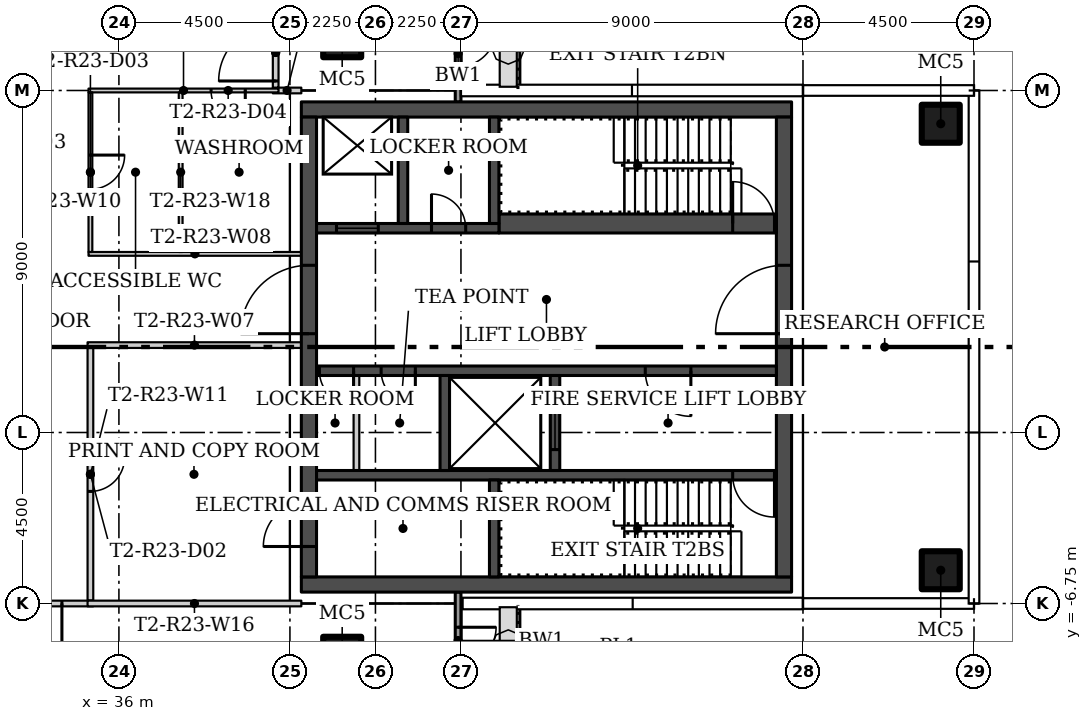
"""IFC4 building model, lengths in metres.
Left out: names, types, materials, properties, quantities, classifications, styles, units other than length and angle.
Written with IfcOpenShell. Run it as: python <this file> out.ifc"""

import sys

from ifc_helpers import new_model, si_unit, direction, frame, frame_2d, origin, origin_2d, place, context, subcontext, project, spatial, rectangle, hollow_rectangle, extrude, element, fill, save


model = new_model("IFC4")
c1 = context("Model", 3, precision=1e-05, world=origin(), true_north=direction((0.0, 1.0)))
c2 = subcontext(c1, "Body", "Model", "MODEL_VIEW")
j1 = project(units=[si_unit("LENGTHUNIT", "METRE"), si_unit("PLANEANGLEUNIT", "RADIAN")], contexts=[c1])
p1 = place(None, origin())
s1 = spatial("IfcSite", under=j1, at=p1, CompositionType="ELEMENT")
p2 = place(p1, origin())
s2 = spatial("IfcBuilding", under=s1, at=p2, CompositionType="ELEMENT")
p3 = place(p2, frame((0.0, 0.0, 210.0)))
s3 = spatial("IfcBuildingStorey", under=s2, at=p3, CompositionType="ELEMENT", Elevation=210.0)
for number, where in (
    (1, (41.875, 8.125, 0.0)),
    (2, (41.875, -8.125, 0.0)),
    (3, (57.625, -5.875, 0.0)),
    (4, (57.625, 5.875, 0.0)),
):
    element("IfcColumn", number, at=place(p3, frame(where)), inside=s3, PredefinedType="COLUMN", context=c2, shape_type="SweptSolid", body=[
        extrude(hollow_rectangle(XDim=1.0, YDim=1.0, WallThickness=0.04, at=origin_2d()), origin(), (0.0, 0.0, 1.0), 3.55),
    ])
p4 = place(p3, frame((40.8, 6.75, 0.0), z_axis=(0.0, 0.0, 1.0), x_axis=(-1.0, 0.0, 0.0)))
e5 = element("IfcWall", 5, at=p4, inside=s3, PredefinedType="PARTITIONING", context=c2, shape_type="SweptSolid", body=[
    extrude(rectangle(XDim=0.75, YDim=0.15, at=frame_2d((0.375, 0.0))), origin(), (0.0, 0.0, 1.0), 3.55),
])
p5 = place(p3, frame((40.8, 0.05, 0.0), z_axis=(0.0, 0.0, 1.0), x_axis=(-1.0, 0.0, 0.0)))
e6 = element("IfcWall", 6, at=p5, inside=s3, PredefinedType="PARTITIONING", context=c2, shape_type="SweptSolid", body=[
    extrude(rectangle(XDim=5.625, YDim=0.15, at=frame_2d((2.812, 0.0))), origin(), (0.0, 0.0, 1.0), 3.55),
])
p6 = place(p3, frame((35.2, 2.45, 0.0)))
e7 = element("IfcWall", 7, at=p6, inside=s3, PredefinedType="PARTITIONING", context=c2, shape_type="SweptSolid", body=[
    extrude(rectangle(XDim=5.6, YDim=0.1, at=frame_2d((2.8, 0.0))), origin(), (0.0, 0.0, 1.0), 3.55),
])
p7 = place(p3, frame((40.2, 6.75, 0.0), z_axis=(0.0, 0.0, 1.0), x_axis=(-1.0, 0.0, 0.0)))
e8 = element("IfcWall", 8, at=p7, inside=s3, PredefinedType="PARTITIONING", context=c2, shape_type="SweptSolid", body=[
    extrude(rectangle(XDim=5.0, YDim=0.1, at=frame_2d((2.5, 0.0))), origin(), (0.0, 0.0, 1.0), 3.55),
])
p8 = place(p7, frame((0.875, 0.0, 0.0)))
e9 = element("IfcOpeningElement", 9, at=p8, cuts=e8, PredefinedType="OPENING", context=c2, shape_type="SweptSolid", body=[
    extrude(rectangle(XDim=0.9, YDim=2.1, at=frame_2d((0.45, 1.05))), frame((0.0, 0.06, 0.0), z_axis=(0.0, -1.0, 0.0), x_axis=(1.0, 0.0, 0.0)), (0.0, 0.0, 1.0), 0.12),
])
p9 = place(p3, frame((35.25, 6.7, 0.0), z_axis=(0.0, 0.0, 1.0), x_axis=(0.0, -1.0, 0.0)))
e10 = element("IfcWall", 10, at=p9, inside=s3, PredefinedType="PARTITIONING", context=c2, shape_type="SweptSolid", body=[
    extrude(rectangle(XDim=4.2, YDim=0.1, at=frame_2d((2.1, 0.0))), origin(), (0.0, 0.0, 1.0), 3.55),
])
p10 = place(p9, frame((1.65, 0.0, 0.0)))
e11 = element("IfcOpeningElement", 11, at=p10, cuts=e10, PredefinedType="OPENING", context=c2, shape_type="SweptSolid", body=[
    extrude(rectangle(XDim=0.9, YDim=2.1, at=frame_2d((0.45, 1.05))), frame((0.0, 0.06, 0.0), z_axis=(0.0, -1.0, 0.0), x_axis=(1.0, 0.0, 0.0)), (0.0, 0.0, 1.0), 0.12),
])
p11 = place(p3, frame((35.25, -0.025, 0.0), z_axis=(0.0, 0.0, 1.0), x_axis=(0.0, -1.0, 0.0)))
e12 = element("IfcWall", 12, at=p11, inside=s3, PredefinedType="PARTITIONING", context=c2, shape_type="SweptSolid", body=[
    extrude(rectangle(XDim=6.65, YDim=0.15, at=frame_2d((3.325, 0.0))), origin(), (0.0, 0.0, 1.0), 3.55),
])
p12 = place(p11, frame((2.875, 0.0, 0.0)))
e13 = element("IfcOpeningElement", 13, at=p12, cuts=e12, PredefinedType="OPENING", context=c2, shape_type="SweptSolid", body=[
    extrude(rectangle(XDim=0.9, YDim=2.1, at=frame_2d((0.45, 1.05))), frame((0.0, 0.085, 0.0), z_axis=(0.0, -1.0, 0.0), x_axis=(1.0, 0.0, 0.0)), (0.0, 0.0, 1.0), 0.17),
])
p13 = place(p3, frame((40.125, 6.825, 0.0), z_axis=(0.0, 0.0, 1.0), x_axis=(0.0, 1.0, 0.0)))
e14 = element("IfcWall", 14, at=p13, inside=s3, PredefinedType="PARTITIONING", context=c2, shape_type="SweptSolid", body=[
    extrude(rectangle(XDim=1.85, YDim=0.15, at=frame_2d((0.925, 0.0))), origin(), (0.0, 0.0, 1.0), 3.55),
])
p14 = place(p13, frame((0.175, 0.0, 0.0)))
e15 = element("IfcOpeningElement", 15, at=p14, cuts=e14, PredefinedType="OPENING", context=c2, shape_type="SweptSolid", body=[
    extrude(rectangle(XDim=1.5, YDim=2.1, at=frame_2d((0.75, 1.05))), frame((0.0, 0.085, 0.0), z_axis=(0.0, -1.0, 0.0), x_axis=(1.0, 0.0, 0.0)), (0.0, 0.0, 1.0), 0.17),
])
p15 = place(p3, frame((35.325, -6.75, 0.0), z_axis=(0.0, 0.0, 1.0), x_axis=(-1.0, 0.0, 0.0)))
e16 = element("IfcWall", 16, at=p15, inside=s3, PredefinedType="PARTITIONING", context=c2, shape_type="SweptSolid", body=[
    extrude(rectangle(XDim=3.15, YDim=0.15, at=frame_2d((1.575, 0.0))), origin(), (0.0, 0.0, 1.0), 3.55),
])
p16 = place(p15, frame((0.825, 0.0, 0.0)))
e17 = element("IfcOpeningElement", 17, at=p16, cuts=e16, PredefinedType="OPENING", context=c2, shape_type="SweptSolid", body=[
    extrude(rectangle(XDim=1.5, YDim=2.1, at=frame_2d((0.75, 1.05))), frame((0.0, 0.085, 0.0), z_axis=(0.0, -1.0, 0.0), x_axis=(1.0, 0.0, 0.0)), (0.0, 0.0, 1.0), 0.17),
])
p17 = place(p3, frame((35.175, -6.75, 0.0)))
e18 = element("IfcWall", 18, at=p17, inside=s3, PredefinedType="PARTITIONING", context=c2, shape_type="SweptSolid", body=[
    extrude(rectangle(XDim=5.625, YDim=0.15, at=frame_2d((2.812, 0.0))), origin(), (0.0, 0.0, 1.0), 3.55),
])
p18 = place(p3, frame((37.625, 6.7, 0.0), z_axis=(0.0, 0.0, 1.0), x_axis=(0.0, -1.0, 0.0)))
e19 = element("IfcWall", 19, at=p18, inside=s3, PredefinedType="PARTITIONING", context=c2, shape_type="SweptSolid", body=[
    extrude(rectangle(XDim=4.2, YDim=0.1, at=frame_2d((2.1, 0.0))), origin(), (0.0, 0.0, 1.0), 3.55),
])
p19 = place(p3, frame((44.925, 9.0, 0.0), z_axis=(0.0, 0.0, 1.0), x_axis=(0.0, -1.0, 0.0)))
e20 = element("IfcWall", 20, at=p19, inside=s3, PredefinedType="SOLIDWALL", context=c2, shape_type="SweptSolid", body=[
    extrude(rectangle(XDim=2.557, YDim=0.15, at=frame_2d((1.278, 0.0))), origin(), (0.0, 0.0, 1.0), 3.45),
])
p20 = place(p19, frame((0.625, 0.0, 0.0)))
e21 = element("IfcOpeningElement", 21, at=p20, cuts=e20, PredefinedType="OPENING", context=c2, shape_type="SweptSolid", body=[
    extrude(rectangle(XDim=1.0, YDim=2.4, at=frame_2d((0.5, 1.2))), frame((0.0, 0.085, 0.0), z_axis=(0.0, -1.0, 0.0), x_axis=(1.0, 0.0, 0.0)), (0.0, 0.0, 1.0), 0.17),
])
p21 = place(p3, frame((44.925, -6.448, 0.0), z_axis=(0.0, 0.0, 1.0), x_axis=(0.0, -1.0, 0.0)))
e22 = element("IfcWall", 22, at=p21, inside=s3, PredefinedType="SOLIDWALL", context=c2, shape_type="SweptSolid", body=[
    extrude(rectangle(XDim=2.552, YDim=0.15, at=frame_2d((1.276, 0.0))), origin(), (0.0, 0.0, 1.0), 3.45),
])
p22 = place(p21, frame((0.927, 0.0, 0.0)))
e23 = element("IfcOpeningElement", 23, at=p22, cuts=e22, PredefinedType="OPENING", context=c2, shape_type="SweptSolid", body=[
    extrude(rectangle(XDim=1.0, YDim=2.4, at=frame_2d((0.5, 1.2))), frame((0.0, 0.085, 0.0), z_axis=(0.0, -1.0, 0.0), x_axis=(1.0, 0.0, 0.0)), (0.0, 0.0, 1.0), 0.17),
])
for number, where, z_axis, x_axis in (
    (24, (53.7, -6.25, 0.0), (0.0, 0.0, 1.0), (-1.0, 0.0, 0.0)),
    (25, (53.7, 6.25, 0.0), (0.0, 0.0, 1.0), (-1.0, 0.0, 0.0)),
):
    element("IfcWall", number, at=place(p3, frame(where, z_axis=z_axis, x_axis=x_axis)), inside=s3, PredefinedType="SHEAR", context=c2, shape_type="SweptSolid", body=[
        extrude(rectangle(XDim=12.9, YDim=0.4, at=frame_2d((6.45, 0.0))), origin(), (0.0, 0.0, 1.0), 3.55),
    ])
p23 = place(p3, frame((53.5, -6.05, 0.0), z_axis=(0.0, 0.0, 1.0), x_axis=(0.0, 1.0, 0.0)))
e26 = element("IfcWall", 26, at=p23, inside=s3, PredefinedType="SHEAR", context=c2, shape_type="SweptSolid", body=[
    extrude(rectangle(XDim=12.1, YDim=0.4, at=frame_2d((6.05, 0.0))), origin(), (0.0, 0.0, 1.0), 3.55),
])
p24 = place(p23, frame((6.4, 0.0, 0.0)))
e27 = element("IfcOpeningElement", 27, at=p24, cuts=e26, PredefinedType="OPENING", context=c2, shape_type="SweptSolid", body=[
    extrude(rectangle(XDim=1.8, YDim=2.4, at=frame_2d((0.9, 1.2))), frame((0.0, 0.21, 0.0), z_axis=(0.0, -1.0, 0.0), x_axis=(1.0, 0.0, 0.0)), (0.0, 0.0, 1.0), 0.42),
])
p25 = place(p3, frame((41.0, -6.05, 0.0), z_axis=(0.0, 0.0, 1.0), x_axis=(0.0, 1.0, 0.0)))
e28 = element("IfcWall", 28, at=p25, inside=s3, PredefinedType="SHEAR", context=c2, shape_type="SweptSolid", body=[
    extrude(rectangle(XDim=12.1, YDim=0.4, at=frame_2d((6.05, 0.0))), origin(), (0.0, 0.0, 1.0), 3.55),
])
p26 = place(p25, frame((0.8, 0.0, 0.0)))
e29 = element("IfcOpeningElement", 29, at=p26, cuts=e28, PredefinedType="OPENING", context=c2, shape_type="SweptSolid", body=[
    extrude(rectangle(XDim=1.2, YDim=2.1, at=frame_2d((0.6, 1.05))), frame((0.0, 0.21, 0.0), z_axis=(0.0, -1.0, 0.0), x_axis=(1.0, 0.0, 0.0)), (0.0, 0.0, 1.0), 0.42),
])
p27 = place(p25, frame((6.4, 0.0, 0.0)))
e30 = element("IfcOpeningElement", 30, at=p27, cuts=e28, PredefinedType="OPENING", context=c2, shape_type="SweptSolid", body=[
    extrude(rectangle(XDim=1.8, YDim=2.4, at=frame_2d((0.9, 1.2))), frame((0.0, 0.21, 0.0), z_axis=(0.0, -1.0, 0.0), x_axis=(1.0, 0.0, 0.0)), (0.0, 0.0, 1.0), 0.42),
])
p28 = place(p3, frame((53.3, -3.375, 0.0), z_axis=(0.0, 0.0, 1.0), x_axis=(-1.0, 0.0, 0.0)))
e31 = element("IfcWall", 31, at=p28, inside=s3, PredefinedType="SHEAR", context=c2, shape_type="SweptSolid", body=[
    extrude(rectangle(XDim=12.1, YDim=0.25, at=frame_2d((6.05, 0.0))), origin(), (0.0, 0.0, 1.0), 3.55),
])
p29 = place(p28, frame((0.05, 0.0, 0.0)))
e32 = element("IfcOpeningElement", 32, at=p29, cuts=e31, PredefinedType="OPENING", context=c2, shape_type="SweptSolid", body=[
    extrude(rectangle(XDim=1.1, YDim=2.1, at=frame_2d((0.55, 1.05))), frame((0.0, 0.135, 0.0), z_axis=(0.0, -1.0, 0.0), x_axis=(1.0, 0.0, 0.0)), (0.0, 0.0, 1.0), 0.27),
])
p30 = place(p3, frame((45.875, -6.05, 0.0), z_axis=(0.0, 0.0, 1.0), x_axis=(0.0, 1.0, 0.0)))
e33 = element("IfcWall", 33, at=p30, inside=s3, PredefinedType="SHEAR", context=c2, shape_type="SweptSolid", body=[
    extrude(rectangle(XDim=2.55, YDim=0.25, at=frame_2d((1.275, 0.0))), origin(), (0.0, 0.0, 1.0), 3.55),
])
p31 = place(p3, frame((53.3, -0.625, 0.0), z_axis=(0.0, 0.0, 1.0), x_axis=(-1.0, 0.0, 0.0)))
e34 = element("IfcWall", 34, at=p31, inside=s3, PredefinedType="SHEAR", context=c2, shape_type="SweptSolid", body=[
    extrude(rectangle(XDim=12.1, YDim=0.25, at=frame_2d((6.05, 0.0))), origin(), (0.0, 0.0, 1.0), 3.55),
])
p32 = place(p31, frame((2.25, 0.0, 0.0)))
e35 = element("IfcOpeningElement", 35, at=p32, cuts=e34, PredefinedType="OPENING", context=c2, shape_type="SweptSolid", body=[
    extrude(rectangle(XDim=1.2, YDim=2.1, at=frame_2d((0.6, 1.05))), frame((0.0, 0.135, 0.0), z_axis=(0.0, -1.0, 0.0), x_axis=(1.0, 0.0, 0.0)), (0.0, 0.0, 1.0), 0.27),
])
p33 = place(p31, frame((9.5, 0.0, 0.0)))
e36 = element("IfcOpeningElement", 36, at=p33, cuts=e34, PredefinedType="OPENING", context=c2, shape_type="SweptSolid", body=[
    extrude(rectangle(XDim=0.9, YDim=2.1, at=frame_2d((0.45, 1.05))), frame((0.0, 0.135, 0.0), z_axis=(0.0, -1.0, 0.0), x_axis=(1.0, 0.0, 0.0)), (0.0, 0.0, 1.0), 0.27),
])
p34 = place(p31, frame((11.125, 0.0, 0.0)))
e37 = element("IfcOpeningElement", 37, at=p34, cuts=e34, PredefinedType="OPENING", context=c2, shape_type="SweptSolid", body=[
    extrude(rectangle(XDim=0.9, YDim=2.1, at=frame_2d((0.45, 1.05))), frame((0.0, 0.135, 0.0), z_axis=(0.0, -1.0, 0.0), x_axis=(1.0, 0.0, 0.0)), (0.0, 0.0, 1.0), 0.27),
])
p35 = place(p3, frame((47.475, -3.25, 0.0), z_axis=(0.0, 0.0, 1.0), x_axis=(0.0, 1.0, 0.0)))
e38 = element("IfcWall", 38, at=p35, inside=s3, PredefinedType="SHEAR", context=c2, shape_type="SweptSolid", body=[
    extrude(rectangle(XDim=2.5, YDim=0.25, at=frame_2d((1.25, 0.0))), origin(), (0.0, 0.0, 1.0), 3.55),
])
p36 = place(p35, frame((0.55, 0.0, 0.0)))
e39 = element("IfcOpeningElement", 39, at=p36, cuts=e38, PredefinedType="OPENING", context=c2, shape_type="SweptSolid", body=[
    extrude(rectangle(XDim=1.4, YDim=2.4, at=frame_2d((0.7, 1.2))), frame((0.0, 0.135, 0.0), z_axis=(0.0, -1.0, 0.0), x_axis=(1.0, 0.0, 0.0)), (0.0, 0.0, 1.0), 0.27),
])
p37 = place(p3, frame((44.575, -3.25, 0.0), z_axis=(0.0, 0.0, 1.0), x_axis=(0.0, 1.0, 0.0)))
e40 = element("IfcWall", 40, at=p37, inside=s3, PredefinedType="SHEAR", context=c2, shape_type="SweptSolid", body=[
    extrude(rectangle(XDim=2.5, YDim=0.25, at=frame_2d((1.25, 0.0))), origin(), (0.0, 0.0, 1.0), 3.55),
])
p38 = place(p3, frame((42.25, -3.25, 0.0), z_axis=(0.0, 0.0, 1.0), x_axis=(0.0, 1.0, 0.0)))
e41 = element("IfcWall", 41, at=p38, inside=s3, PredefinedType="PARTITIONING", context=c2, shape_type="SweptSolid", body=[
    extrude(rectangle(XDim=2.5, YDim=0.15, at=frame_2d((1.25, 0.0))), origin(), (0.0, 0.0, 1.0), 3.55),
])
p39 = place(p3, frame((46.0, 3.25, 0.0)))
e42 = element("IfcWall", 42, at=p39, inside=s3, PredefinedType="SHEAR", context=c2, shape_type="SweptSolid", body=[
    extrude(rectangle(XDim=7.3, YDim=0.5, at=frame_2d((3.65, 0.0))), origin(), (0.0, 0.0, 1.0), 3.55),
])
p40 = place(p39, frame((6.15, 0.0, 0.0)))
e43 = element("IfcOpeningElement", 43, at=p40, cuts=e42, PredefinedType="OPENING", context=c2, shape_type="SweptSolid", body=[
    extrude(rectangle(XDim=1.1, YDim=2.1, at=frame_2d((0.55, 1.05))), frame((0.0, 0.26, 0.0), z_axis=(0.0, -1.0, 0.0), x_axis=(1.0, 0.0, 0.0)), (0.0, 0.0, 1.0), 0.52),
])
p41 = place(p3, frame((41.2, 3.125, 0.0)))
e44 = element("IfcWall", 44, at=p41, inside=s3, PredefinedType="SHEAR", context=c2, shape_type="SweptSolid", body=[
    extrude(rectangle(XDim=4.8, YDim=0.25, at=frame_2d((2.4, 0.0))), origin(), (0.0, 0.0, 1.0), 3.55),
])
p42 = place(p41, frame((0.525, 0.0, 0.0)))
e45 = element("IfcOpeningElement", 45, at=p42, cuts=e44, PredefinedType="OPENING", context=c2, shape_type="SweptSolid", body=[
    extrude(rectangle(XDim=1.1, YDim=2.1, at=frame_2d((0.55, 1.05))), frame((0.0, 0.135, 0.0), z_axis=(0.0, -1.0, 0.0), x_axis=(1.0, 0.0, 0.0)), (0.0, 0.0, 1.0), 0.27),
])
p43 = place(p41, frame((3.025, 0.0, 0.0)))
e46 = element("IfcOpeningElement", 46, at=p43, cuts=e44, PredefinedType="OPENING", context=c2, shape_type="SweptSolid", body=[
    extrude(rectangle(XDim=0.9, YDim=2.1, at=frame_2d((0.45, 1.05))), frame((0.0, 0.135, 0.0), z_axis=(0.0, -1.0, 0.0), x_axis=(1.0, 0.0, 0.0)), (0.0, 0.0, 1.0), 0.27),
])
for number, where, z_axis, x_axis in (
    (47, (45.875, 3.25, 0.0), (0.0, 0.0, 1.0), (0.0, 1.0, 0.0)),
    (48, (43.475, 3.25, 0.0), (0.0, 0.0, 1.0), (0.0, 1.0, 0.0)),
):
    element("IfcWall", number, at=place(p3, frame(where, z_axis=z_axis, x_axis=x_axis)), inside=s3, PredefinedType="SHEAR", context=c2, shape_type="SweptSolid", body=[
        extrude(rectangle(XDim=2.8, YDim=0.25, at=frame_2d((1.4, 0.0))), origin(), (0.0, 0.0, 1.0), 3.55),
    ])
p44 = place(p14, origin())
e49 = element("IfcDoor", 49, at=p44, inside=s3, OperationType="DOUBLE_DOOR_SINGLE_SWING", PredefinedType="DOOR", context=c2, shape_type="SweptSolid", body=[
    extrude(rectangle(XDim=1.5, YDim=2.1, at=frame_2d((0.75, 1.05))), frame((0.0, 0.025, 0.0), z_axis=(0.0, -1.0, 0.0), x_axis=(1.0, 0.0, 0.0)), (0.0, 0.0, 1.0), 0.05),
])
fill(e15, e49)
p45 = place(p12, origin())
e50 = element("IfcDoor", 50, at=p45, inside=s3, OperationType="SINGLE_SWING_RIGHT", PredefinedType="DOOR", context=c2, shape_type="SweptSolid", body=[
    extrude(rectangle(XDim=0.9, YDim=2.1, at=frame_2d((0.45, 1.05))), frame((0.0, 0.025, 0.0), z_axis=(0.0, -1.0, 0.0), x_axis=(1.0, 0.0, 0.0)), (0.0, 0.0, 1.0), 0.05),
])
fill(e13, e50)
p46 = place(p10, origin())
e51 = element("IfcDoor", 51, at=p46, inside=s3, OperationType="SINGLE_SWING_RIGHT", PredefinedType="DOOR", context=c2, shape_type="SweptSolid", body=[
    extrude(rectangle(XDim=0.9, YDim=2.1, at=frame_2d((0.45, 1.05))), frame((0.0, 0.025, 0.0), z_axis=(0.0, -1.0, 0.0), x_axis=(1.0, 0.0, 0.0)), (0.0, 0.0, 1.0), 0.05),
])
fill(e11, e51)
p47 = place(p8, origin())
e52 = element("IfcDoor", 52, at=p47, inside=s3, OperationType="SINGLE_SWING_RIGHT", PredefinedType="DOOR", context=c2, shape_type="SweptSolid", body=[
    extrude(rectangle(XDim=0.9, YDim=2.1, at=frame_2d((0.45, 1.05))), frame((0.0, 0.025, 0.0), z_axis=(0.0, -1.0, 0.0), x_axis=(1.0, 0.0, 0.0)), (0.0, 0.0, 1.0), 0.05),
])
fill(e9, e52)
p48 = place(p16, origin())
e53 = element("IfcDoor", 53, at=p48, inside=s3, OperationType="DOUBLE_DOOR_SINGLE_SWING", PredefinedType="DOOR", context=c2, shape_type="SweptSolid", body=[
    extrude(rectangle(XDim=1.5, YDim=2.1, at=frame_2d((0.75, 1.05))), frame((0.0, 0.025, 0.0), z_axis=(0.0, -1.0, 0.0), x_axis=(1.0, 0.0, 0.0)), (0.0, 0.0, 1.0), 0.05),
])
fill(e17, e53)
p49 = place(p20, origin())
e54 = element("IfcDoor", 54, at=p49, inside=s3, OperationType="SINGLE_SWING_LEFT", PredefinedType="DOOR", context=c2, shape_type="SweptSolid", body=[
    extrude(rectangle(XDim=1.0, YDim=2.4, at=frame_2d((0.5, 1.2))), frame((0.0, 0.025, 0.0), z_axis=(0.0, -1.0, 0.0), x_axis=(1.0, 0.0, 0.0)), (0.0, 0.0, 1.0), 0.05),
])
fill(e21, e54)
p50 = place(p22, origin())
e55 = element("IfcDoor", 55, at=p50, inside=s3, OperationType="SINGLE_SWING_RIGHT", PredefinedType="DOOR", context=c2, shape_type="SweptSolid", body=[
    extrude(rectangle(XDim=1.0, YDim=2.4, at=frame_2d((0.5, 1.2))), frame((0.0, 0.025, 0.0), z_axis=(0.0, -1.0, 0.0), x_axis=(1.0, 0.0, 0.0)), (0.0, 0.0, 1.0), 0.05),
])
fill(e23, e55)
p51 = place(p24, origin())
e56 = element("IfcDoor", 56, at=p51, inside=s3, OperationType="DOUBLE_DOOR_SINGLE_SWING", PredefinedType="DOOR", context=c2, shape_type="SweptSolid", body=[
    extrude(rectangle(XDim=1.8, YDim=2.4, at=frame_2d((0.9, 1.2))), frame((0.0, 0.025, 0.0), z_axis=(0.0, -1.0, 0.0), x_axis=(1.0, 0.0, 0.0)), (0.0, 0.0, 1.0), 0.05),
])
fill(e27, e56)
p52 = place(p26, origin())
e57 = element("IfcDoor", 57, at=p52, inside=s3, OperationType="SINGLE_SWING_LEFT", PredefinedType="DOOR", context=c2, shape_type="SweptSolid", body=[
    extrude(rectangle(XDim=1.2, YDim=2.1, at=frame_2d((0.6, 1.05))), frame((0.0, 0.025, 0.0), z_axis=(0.0, -1.0, 0.0), x_axis=(1.0, 0.0, 0.0)), (0.0, 0.0, 1.0), 0.05),
])
fill(e29, e57)
p53 = place(p27, origin())
e58 = element("IfcDoor", 58, at=p53, inside=s3, OperationType="DOUBLE_DOOR_SINGLE_SWING", PredefinedType="DOOR", context=c2, shape_type="SweptSolid", body=[
    extrude(rectangle(XDim=1.8, YDim=2.4, at=frame_2d((0.9, 1.2))), frame((0.0, 0.025, 0.0), z_axis=(0.0, -1.0, 0.0), x_axis=(1.0, 0.0, 0.0)), (0.0, 0.0, 1.0), 0.05),
])
fill(e30, e58)
p54 = place(p29, origin())
e59 = element("IfcDoor", 59, at=p54, inside=s3, OperationType="SINGLE_SWING_LEFT", PredefinedType="DOOR", context=c2, shape_type="SweptSolid", body=[
    extrude(rectangle(XDim=1.1, YDim=2.1, at=frame_2d((0.55, 1.05))), frame((0.0, 0.025, 0.0), z_axis=(0.0, -1.0, 0.0), x_axis=(1.0, 0.0, 0.0)), (0.0, 0.0, 1.0), 0.05),
])
fill(e32, e59)
p55 = place(p32, origin())
e60 = element("IfcDoor", 60, at=p55, inside=s3, OperationType="SINGLE_SWING_LEFT", PredefinedType="DOOR", context=c2, shape_type="SweptSolid", body=[
    extrude(rectangle(XDim=1.2, YDim=2.1, at=frame_2d((0.6, 1.05))), frame((0.0, 0.025, 0.0), z_axis=(0.0, -1.0, 0.0), x_axis=(1.0, 0.0, 0.0)), (0.0, 0.0, 1.0), 0.05),
])
fill(e35, e60)
p56 = place(p33, origin())
e61 = element("IfcDoor", 61, at=p56, inside=s3, OperationType="SINGLE_SWING_RIGHT", PredefinedType="DOOR", context=c2, shape_type="SweptSolid", body=[
    extrude(rectangle(XDim=0.9, YDim=2.1, at=frame_2d((0.45, 1.05))), frame((0.0, 0.025, 0.0), z_axis=(0.0, -1.0, 0.0), x_axis=(1.0, 0.0, 0.0)), (0.0, 0.0, 1.0), 0.05),
])
fill(e36, e61)
p57 = place(p34, origin())
e62 = element("IfcDoor", 62, at=p57, inside=s3, OperationType="SINGLE_SWING_RIGHT", PredefinedType="DOOR", context=c2, shape_type="SweptSolid", body=[
    extrude(rectangle(XDim=0.9, YDim=2.1, at=frame_2d((0.45, 1.05))), frame((0.0, 0.025, 0.0), z_axis=(0.0, -1.0, 0.0), x_axis=(1.0, 0.0, 0.0)), (0.0, 0.0, 1.0), 0.05),
])
fill(e37, e62)
p58 = place(p36, origin())
e63 = element("IfcDoor", 63, at=p58, inside=s3, OperationType="SLIDING_TO_LEFT", PredefinedType="DOOR", context=c2, shape_type="SweptSolid", body=[
    extrude(rectangle(XDim=1.4, YDim=2.4, at=frame_2d((0.7, 1.2))), frame((0.0, 0.025, 0.0), z_axis=(0.0, -1.0, 0.0), x_axis=(1.0, 0.0, 0.0)), (0.0, 0.0, 1.0), 0.05),
])
fill(e39, e63)
p59 = place(p40, origin())
e64 = element("IfcDoor", 64, at=p59, inside=s3, OperationType="SINGLE_SWING_RIGHT", PredefinedType="DOOR", context=c2, shape_type="SweptSolid", body=[
    extrude(rectangle(XDim=1.1, YDim=2.1, at=frame_2d((0.55, 1.05))), frame((0.0, 0.025, 0.0), z_axis=(0.0, -1.0, 0.0), x_axis=(1.0, 0.0, 0.0)), (0.0, 0.0, 1.0), 0.05),
])
fill(e43, e64)
p60 = place(p42, origin())
e65 = element("IfcDoor", 65, at=p60, inside=s3, OperationType="SLIDING_TO_LEFT", PredefinedType="DOOR", context=c2, shape_type="SweptSolid", body=[
    extrude(rectangle(XDim=1.1, YDim=2.1, at=frame_2d((0.55, 1.05))), frame((0.0, 0.025, 0.0), z_axis=(0.0, -1.0, 0.0), x_axis=(1.0, 0.0, 0.0)), (0.0, 0.0, 1.0), 0.05),
])
fill(e45, e65)
p61 = place(p43, origin())
e66 = element("IfcDoor", 66, at=p61, inside=s3, OperationType="SINGLE_SWING_RIGHT", PredefinedType="DOOR", context=c2, shape_type="SweptSolid", body=[
    extrude(rectangle(XDim=0.9, YDim=2.1, at=frame_2d((0.45, 1.05))), frame((0.0, 0.025, 0.0), z_axis=(0.0, -1.0, 0.0), x_axis=(1.0, 0.0, 0.0)), (0.0, 0.0, 1.0), 0.05),
])
fill(e46, e66)
save(model, sys.argv[1])
